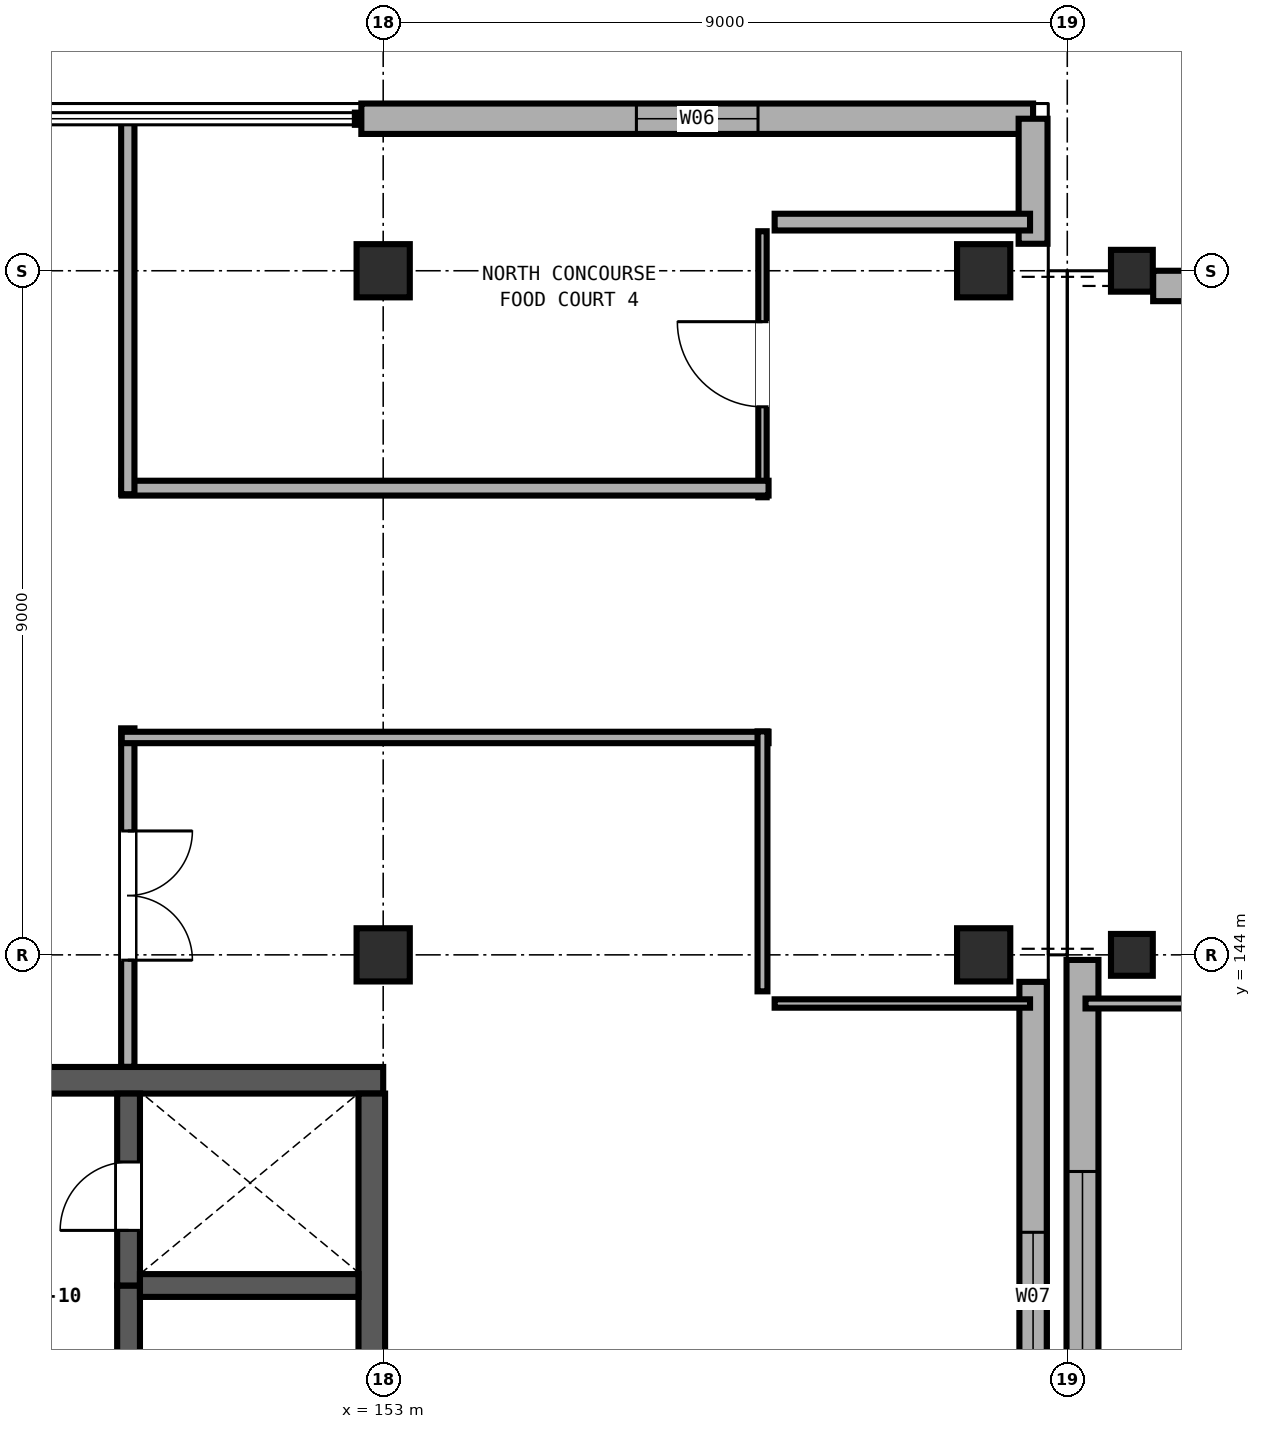
"""IFC4 building model, lengths in metres.
Left out: names, types, materials, properties, quantities, classifications, styles, units other than length and angle.
Written with IfcOpenShell. Run it as: python <this file> out.ifc"""

import sys

from ifc_helpers import new_model, si_unit, direction, frame, frame_2d, origin, origin_2d, place, context, subcontext, project, spatial, rectangle, extrude, element, fill, save


model = new_model("IFC4")
c1 = context("Model", 3, precision=1e-05, world=origin(), true_north=direction((0.0, 1.0)))
c2 = subcontext(c1, "Body", "Model", "MODEL_VIEW")
j1 = project(units=[si_unit("LENGTHUNIT", "METRE"), si_unit("PLANEANGLEUNIT", "RADIAN")], contexts=[c1])
p1 = place(None, origin())
s1 = spatial("IfcSite", under=j1, at=p1, CompositionType="ELEMENT")
p2 = place(p1, origin())
s2 = spatial("IfcBuilding", under=s1, at=p2, CompositionType="ELEMENT")
p3 = place(p2, frame((0.0, 0.0, 9.6)))
s3 = spatial("IfcBuildingStorey", under=s2, at=p3, CompositionType="ELEMENT", Elevation=9.6)
for number, where, z_axis, x_axis in (
    (1, (153.0, 144.0, 0.0), (0.0, 0.0, 1.0), (1.0, 0.0, 0.0)),
    (2, (153.0, 153.0, 0.0), (0.0, 0.0, 1.0), (1.0, 0.0, 0.0)),
    (3, (160.9, 144.0, 0.0), (0.0, 0.0, 1.0), (1.0, 0.0, 0.0)),
    (4, (160.9, 153.0, 0.0), (0.0, 0.0, 1.0), (1.0, 0.0, 0.0)),
):
    element("IfcColumn", number, at=place(p3, frame(where, z_axis=z_axis, x_axis=x_axis)), inside=s3, PredefinedType="COLUMN", context=c2, shape_type="SweptSolid", body=[
        extrude(rectangle(XDim=0.7, YDim=0.7, at=origin_2d()), origin(), (0.0, 0.0, 1.0), 4.8),
    ])
for number, where, z_axis, x_axis in (
    (5, (162.85, 144.0, 0.0), (0.0, 0.0, 1.0), (1.0, 0.0, 0.0)),
    (6, (162.85, 153.0, 0.0), (0.0, 0.0, 1.0), (1.0, 0.0, 0.0)),
):
    element("IfcColumn", number, at=place(p3, frame(where, z_axis=z_axis, x_axis=x_axis)), inside=s3, PredefinedType="COLUMN", context=c2, shape_type="SweptSolid", body=[
        extrude(rectangle(XDim=0.55, YDim=0.55, at=origin_2d()), origin(), (0.0, 0.0, 1.0), 4.8),
    ])
p4 = place(p3, frame((153.0, 142.35, 0.0), z_axis=(0.0, 0.0, 1.0), x_axis=(-1.0, 0.0, 0.0)))
e7 = element("IfcWall", 7, at=p4, inside=s3, PredefinedType="SHEAR", context=c2, shape_type="SweptSolid", body=[
    extrude(rectangle(XDim=18.0, YDim=0.35, at=frame_2d((9.0, 0.0))), origin(), (0.0, 0.0, 1.0), 4.5),
])
p5 = place(p4, frame((4.7, 0.0, 0.0)))
e8 = element("IfcOpeningElement", 8, at=p5, cuts=e7, PredefinedType="OPENING", context=c2, shape_type="SweptSolid", body=[
    extrude(rectangle(XDim=1.9, YDim=2.25, at=frame_2d((0.95, 1.125))), frame((0.0, 0.185, 0.0), z_axis=(0.0, -1.0, 0.0), x_axis=(1.0, 0.0, 0.0)), (0.0, 0.0, 1.0), 0.37),
])
p6 = place(p3, frame((152.85, 136.825, 0.0), z_axis=(0.0, 0.0, 1.0), x_axis=(0.0, 1.0, 0.0)))
e9 = element("IfcWall", 9, at=p6, inside=s3, PredefinedType="SHEAR", context=c2, shape_type="SweptSolid", body=[
    extrude(rectangle(XDim=5.35, YDim=0.35, at=frame_2d((2.675, 0.0))), origin(), (0.0, 0.0, 1.0), 4.5),
])
p7 = place(p3, frame((149.65, 136.825, 0.0), z_axis=(0.0, 0.0, 1.0), x_axis=(0.0, 1.0, 0.0)))
e10 = element("IfcWall", 10, at=p7, inside=s3, PredefinedType="SHEAR", context=c2, shape_type="SweptSolid", body=[
    extrude(rectangle(XDim=2.825, YDim=0.3, at=frame_2d((1.413, 0.0))), origin(), (0.0, 0.0, 1.0), 4.5),
])
p8 = place(p3, frame((149.65, 139.65, 0.0), z_axis=(0.0, 0.0, 1.0), x_axis=(0.0, 1.0, 0.0)))
e11 = element("IfcWall", 11, at=p8, inside=s3, PredefinedType="SHEAR", context=c2, shape_type="SweptSolid", body=[
    extrude(rectangle(XDim=2.525, YDim=0.3, at=frame_2d((1.263, 0.0))), origin(), (0.0, 0.0, 1.0), 4.5),
])
p9 = place(p8, frame((0.725, 0.0, 0.0)))
e12 = element("IfcOpeningElement", 12, at=p9, cuts=e11, PredefinedType="OPENING", context=c2, shape_type="SweptSolid", body=[
    extrude(rectangle(XDim=0.9, YDim=2.1, at=frame_2d((0.45, 1.05))), frame((0.0, 0.16, 0.0), z_axis=(0.0, -1.0, 0.0), x_axis=(1.0, 0.0, 0.0)), (0.0, 0.0, 1.0), 0.32),
])
p10 = place(p3, frame((149.8, 139.65, 0.0), z_axis=(0.0, 0.0, 1.0), x_axis=(1.0, 0.0, 0.0)))
e13 = element("IfcWall", 13, at=p10, inside=s3, PredefinedType="SHEAR", context=c2, shape_type="SweptSolid", body=[
    extrude(rectangle(XDim=2.875, YDim=0.3, at=frame_2d((1.438, 0.0))), origin(), (0.0, 0.0, 1.0), 4.5),
])
p11 = place(p3, frame((152.712, 155.0, 0.0), z_axis=(0.0, 0.0, 1.0), x_axis=(1.0, 0.0, 0.0)))
e14 = element("IfcWall", 14, at=p11, inside=s3, PredefinedType="SOLIDWALL", context=c2, shape_type="SweptSolid", body=[
    extrude(rectangle(XDim=8.838, YDim=0.4, at=frame_2d((4.419, 0.0))), origin(), (0.0, 0.0, 1.0), 3.58),
])
p12 = place(p11, frame((3.619, 0.0, 0.9)))
e15 = element("IfcOpeningElement", 15, at=p12, cuts=e14, PredefinedType="OPENING", context=c2, shape_type="SweptSolid", body=[
    extrude(rectangle(XDim=1.6, YDim=1.65, at=frame_2d((0.8, 0.825))), frame((0.0, 0.21, 0.0), z_axis=(0.0, -1.0, 0.0), x_axis=(1.0, 0.0, 0.0)), (0.0, 0.0, 1.0), 0.42),
])
p13 = place(p3, frame((161.55, 155.0, 0.0), z_axis=(0.0, 0.0, 1.0), x_axis=(0.0, -1.0, 0.0)))
e16 = element("IfcWall", 16, at=p13, inside=s3, PredefinedType="SOLIDWALL", context=c2, shape_type="SweptSolid", body=[
    extrude(rectangle(XDim=1.645, YDim=0.38, at=frame_2d((0.823, 0.0))), origin(), (0.0, 0.0, 1.0), 3.58),
])
p14 = place(p3, frame((161.55, 143.645, 0.0), z_axis=(0.0, 0.0, 1.0), x_axis=(0.0, -1.0, 0.0)))
e17 = element("IfcWall", 17, at=p14, inside=s3, PredefinedType="SOLIDWALL", context=c2, shape_type="SweptSolid", body=[
    extrude(rectangle(XDim=8.29, YDim=0.36, at=frame_2d((4.145, 0.0))), origin(), (0.0, 0.0, 1.0), 3.58),
])
p15 = place(p14, frame((3.295, 0.0, 0.9)))
e18 = element("IfcOpeningElement", 18, at=p15, cuts=e17, PredefinedType="OPENING", context=c2, shape_type="SweptSolid", body=[
    extrude(rectangle(XDim=1.7, YDim=1.7, at=frame_2d((0.85, 0.85))), frame((0.0, 0.19, 0.0), z_axis=(0.0, -1.0, 0.0), x_axis=(1.0, 0.0, 0.0)), (0.0, 0.0, 1.0), 0.38),
])
p16 = place(p3, frame((162.2, 135.067, 0.0), z_axis=(0.0, 0.0, 1.0), x_axis=(0.0, 1.0, 0.0)))
e19 = element("IfcWall", 19, at=p16, inside=s3, PredefinedType="SOLIDWALL", context=c2, shape_type="SweptSolid", body=[
    extrude(rectangle(XDim=8.867, YDim=0.42, at=frame_2d((4.433, 0.0))), origin(), (0.0, 0.0, 1.0), 3.58),
])
p17 = place(p16, frame((2.783, 0.0, 0.9)))
e20 = element("IfcOpeningElement", 20, at=p17, cuts=e19, PredefinedType="OPENING", context=c2, shape_type="SweptSolid", body=[
    extrude(rectangle(XDim=3.3, YDim=2.0, at=frame_2d((1.65, 1.0))), frame((0.0, 0.22, 0.0), z_axis=(0.0, -1.0, 0.0), x_axis=(1.0, 0.0, 0.0)), (0.0, 0.0, 1.0), 0.44),
])
p18 = place(p3, frame((163.13, 152.8, 0.0), z_axis=(0.0, 0.0, 1.0), x_axis=(1.0, 0.0, 0.0)))
e21 = element("IfcWall", 21, at=p18, inside=s3, PredefinedType="SOLIDWALL", context=c2, shape_type="SweptSolid", body=[
    extrude(rectangle(XDim=7.59, YDim=0.4, at=frame_2d((3.795, 0.0))), origin(), (0.0, 0.0, 1.0), 3.58),
])
p19 = place(p18, frame((3.15, 0.0, 0.9)))
e22 = element("IfcOpeningElement", 22, at=p19, cuts=e21, PredefinedType="OPENING", context=c2, shape_type="SweptSolid", body=[
    extrude(rectangle(XDim=3.4, YDim=1.95, at=frame_2d((1.7, 0.975))), frame((0.0, 0.21, 0.0), z_axis=(0.0, -1.0, 0.0), x_axis=(1.0, 0.0, 0.0)), (0.0, 0.0, 1.0), 0.42),
])
p20 = place(p3, frame((149.64, 146.98, 0.0), z_axis=(0.0, 0.0, 1.0), x_axis=(0.0, -1.0, 0.0)))
e23 = element("IfcWall", 23, at=p20, inside=s3, PredefinedType="PARTITIONING", context=c2, shape_type="SweptSolid", body=[
    extrude(rectangle(XDim=4.453, YDim=0.175, at=frame_2d((2.227, 0.0))), origin(), (0.0, 0.0, 1.0), 3.56),
])
p21 = place(p20, frame((1.35, 0.0, 0.0)))
e24 = element("IfcOpeningElement", 24, at=p21, cuts=e23, PredefinedType="OPENING", context=c2, shape_type="SweptSolid", body=[
    extrude(rectangle(XDim=1.7, YDim=2.2, at=frame_2d((0.85, 1.1))), frame((0.0, 0.097, 0.0), z_axis=(0.0, -1.0, 0.0), x_axis=(1.0, 0.0, 0.0)), (0.0, 0.0, 1.0), 0.195),
])
p22 = place(p3, frame((149.56, 146.86, 0.0), z_axis=(0.0, 0.0, 1.0), x_axis=(1.0, 0.0, 0.0)))
e25 = element("IfcWall", 25, at=p22, inside=s3, PredefinedType="PARTITIONING", context=c2, shape_type="SweptSolid", body=[
    extrude(rectangle(XDim=8.51, YDim=0.15, at=frame_2d((4.255, 0.0))), origin(), (0.0, 0.0, 1.0), 3.56),
])
p23 = place(p3, frame((157.99, 146.94, 0.0), z_axis=(0.0, 0.0, 1.0), x_axis=(0.0, -1.0, 0.0)))
e26 = element("IfcWall", 26, at=p23, inside=s3, PredefinedType="PARTITIONING", context=c2, shape_type="SweptSolid", body=[
    extrude(rectangle(XDim=3.42, YDim=0.13, at=frame_2d((1.71, 0.0))), origin(), (0.0, 0.0, 1.0), 3.56),
])
p24 = place(p3, frame((158.15, 143.36, 0.0), z_axis=(0.0, 0.0, 1.0), x_axis=(1.0, 0.0, 0.0)))
e27 = element("IfcWall", 27, at=p24, inside=s3, PredefinedType="PARTITIONING", context=c2, shape_type="SweptSolid", body=[
    extrude(rectangle(XDim=3.36, YDim=0.11, at=frame_2d((1.68, 0.0))), origin(), (0.0, 0.0, 1.0), 3.56),
])
p25 = place(p3, frame((157.99, 150.02, 0.0), z_axis=(0.0, 0.0, 1.0), x_axis=(0.0, 1.0, 0.0)))
e28 = element("IfcWall", 28, at=p25, inside=s3, PredefinedType="PARTITIONING", context=c2, shape_type="SweptSolid", body=[
    extrude(rectangle(XDim=3.5, YDim=0.11, at=frame_2d((1.75, 0.0))), origin(), (0.0, 0.0, 1.0), 3.56),
])
p26 = place(p25, frame((1.19, 0.0, 0.0)))
e29 = element("IfcOpeningElement", 29, at=p26, cuts=e28, PredefinedType="OPENING", context=c2, shape_type="SweptSolid", body=[
    extrude(rectangle(XDim=1.12, YDim=2.22, at=frame_2d((0.56, 1.11))), frame((0.0, 0.065, 0.0), z_axis=(0.0, -1.0, 0.0), x_axis=(1.0, 0.0, 0.0)), (0.0, 0.0, 1.0), 0.13),
])
p27 = place(p3, frame((161.51, 153.64, 0.0), z_axis=(0.0, 0.0, 1.0), x_axis=(-1.0, 0.0, 0.0)))
e30 = element("IfcWall", 30, at=p27, inside=s3, PredefinedType="PARTITIONING", context=c2, shape_type="SweptSolid", body=[
    extrude(rectangle(XDim=3.36, YDim=0.22, at=frame_2d((1.68, 0.0))), origin(), (0.0, 0.0, 1.0), 3.56),
])
p28 = place(p3, frame((158.07, 150.14, 0.0), z_axis=(0.0, 0.0, 1.0), x_axis=(-1.0, 0.0, 0.0)))
e31 = element("IfcWall", 31, at=p28, inside=s3, PredefinedType="PARTITIONING", context=c2, shape_type="SweptSolid", body=[
    extrude(rectangle(XDim=8.51, YDim=0.195, at=frame_2d((4.255, 0.0))), origin(), (0.0, 0.0, 1.0), 3.56),
])
p29 = place(p3, frame((149.64, 150.06, 0.0), z_axis=(0.0, 0.0, 1.0), x_axis=(0.0, 1.0, 0.0)))
e32 = element("IfcWall", 32, at=p29, inside=s3, PredefinedType="PARTITIONING", context=c2, shape_type="SweptSolid", body=[
    extrude(rectangle(XDim=4.907, YDim=0.175, at=frame_2d((2.454, 0.0))), origin(), (0.0, 0.0, 1.0), 3.56),
])
p30 = place(p3, frame((162.24, 143.36, 0.0), z_axis=(0.0, 0.0, 1.0), x_axis=(1.0, 0.0, 0.0)))
e33 = element("IfcWall", 33, at=p30, inside=s3, PredefinedType="PARTITIONING", context=c2, shape_type="SweptSolid", body=[
    extrude(rectangle(XDim=3.01, YDim=0.13, at=frame_2d((1.505, 0.0))), origin(), (0.0, 0.0, 1.0), 3.56),
])
p31 = place(p12, origin())
e34 = element("IfcWindow", 34, at=p31, inside=s3, PartitioningType="SINGLE_PANEL", PredefinedType="WINDOW", context=c2, shape_type="SweptSolid", body=[
    extrude(rectangle(XDim=1.6, YDim=1.65, at=frame_2d((0.8, 0.825))), frame((0.0, 0.03, 0.0), z_axis=(0.0, -1.0, 0.0), x_axis=(1.0, 0.0, 0.0)), (0.0, 0.0, 1.0), 0.06),
])
fill(e15, e34)
p32 = place(p15, origin())
e35 = element("IfcWindow", 35, at=p32, inside=s3, PartitioningType="SINGLE_PANEL", PredefinedType="WINDOW", context=c2, shape_type="SweptSolid", body=[
    extrude(rectangle(XDim=1.7, YDim=1.7, at=frame_2d((0.85, 0.85))), frame((0.0, 0.03, 0.0), z_axis=(0.0, -1.0, 0.0), x_axis=(1.0, 0.0, 0.0)), (0.0, 0.0, 1.0), 0.06),
])
fill(e18, e35)
p33 = place(p17, origin())
e36 = element("IfcWindow", 36, at=p33, inside=s3, PartitioningType="DOUBLE_PANEL_VERTICAL", PredefinedType="WINDOW", context=c2, shape_type="SweptSolid", body=[
    extrude(rectangle(XDim=3.3, YDim=2.0, at=frame_2d((1.65, 1.0))), frame((0.0, 0.03, 0.0), z_axis=(0.0, -1.0, 0.0), x_axis=(1.0, 0.0, 0.0)), (0.0, 0.0, 1.0), 0.06),
])
fill(e20, e36)
p34 = place(p9, origin())
e37 = element("IfcDoor", 37, at=p34, inside=s3, OperationType="SINGLE_SWING_LEFT", PredefinedType="DOOR", context=c2, shape_type="SweptSolid", body=[
    extrude(rectangle(XDim=0.9, YDim=2.1, at=frame_2d((0.45, 1.05))), frame((0.0, 0.025, 0.0), z_axis=(0.0, -1.0, 0.0), x_axis=(1.0, 0.0, 0.0)), (0.0, 0.0, 1.0), 0.05),
])
fill(e12, e37)
p35 = place(p21, origin())
e38 = element("IfcDoor", 38, at=p35, inside=s3, OperationType="DOUBLE_DOOR_SINGLE_SWING", PredefinedType="DOOR", context=c2, shape_type="SweptSolid", body=[
    extrude(rectangle(XDim=1.7, YDim=2.2, at=frame_2d((0.85, 1.1))), frame((0.0, 0.025, 0.0), z_axis=(0.0, -1.0, 0.0), x_axis=(1.0, 0.0, 0.0)), (0.0, 0.0, 1.0), 0.05),
])
fill(e24, e38)
p36 = place(p26, origin())
e39 = element("IfcDoor", 39, at=p36, inside=s3, OperationType="SINGLE_SWING_RIGHT", PredefinedType="DOOR", context=c2, shape_type="SweptSolid", body=[
    extrude(rectangle(XDim=1.12, YDim=2.22, at=frame_2d((0.56, 1.11))), frame((0.0, 0.025, 0.0), z_axis=(0.0, -1.0, 0.0), x_axis=(1.0, 0.0, 0.0)), (0.0, 0.0, 1.0), 0.05),
])
fill(e29, e39)
save(model, sys.argv[1])
